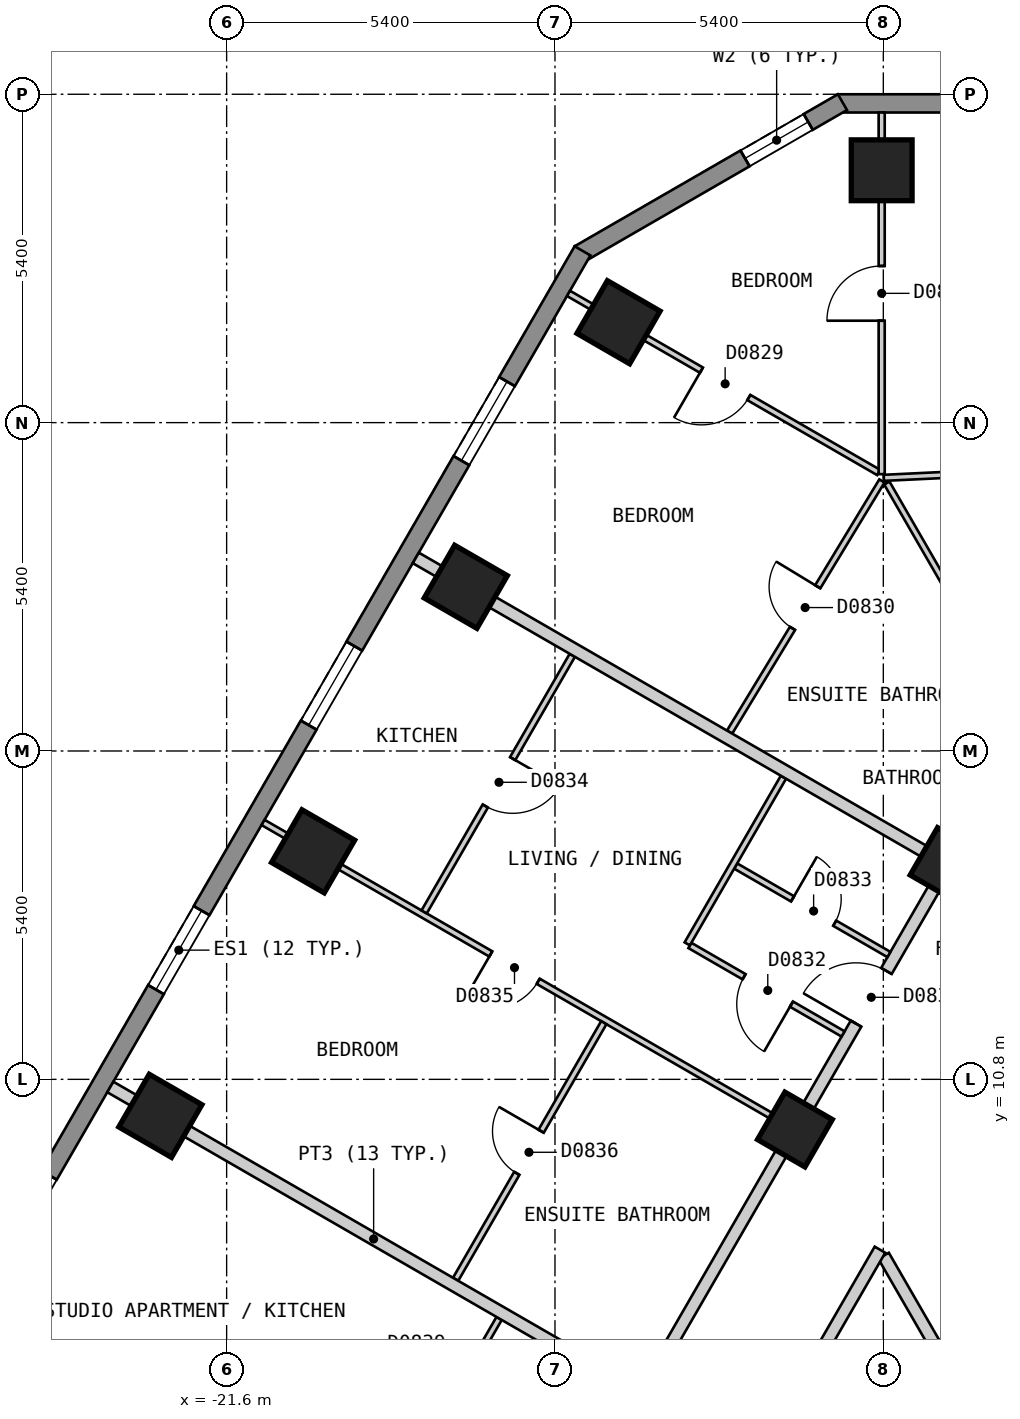
"""IFC4 building model, lengths in metres.
Left out: names, types, materials, properties, quantities, classifications, styles, units other than length and angle.
Written with IfcOpenShell. Run it as: python <this file> out.ifc"""

import sys

from ifc_helpers import new_model, si_unit, direction, frame, frame_2d, origin, origin_2d, place, context, subcontext, project, spatial, polyline, rectangle, outline, extrude, element, fill, save


model = new_model("IFC4")
c1 = context("Model", 3, precision=1e-05, world=origin(), true_north=direction((0.0, 1.0)))
c2 = subcontext(c1, "Body", "Model", "MODEL_VIEW")
j1 = project(units=[si_unit("LENGTHUNIT", "METRE"), si_unit("PLANEANGLEUNIT", "RADIAN")], contexts=[c1])
p1 = place(None, origin())
s1 = spatial("IfcSite", under=j1, at=p1, CompositionType="ELEMENT")
p2 = place(p1, origin())
s2 = spatial("IfcBuilding", under=s1, at=p2, CompositionType="ELEMENT")
p3 = place(p2, frame((0.0, 0.0, 72.0)))
s3 = spatial("IfcBuildingStorey", under=s2, at=p3, CompositionType="ELEMENT", Elevation=72.0)
for number, where, z_axis, x_axis in (
    (1, (-10.827, 25.75, 0.0), (0.0, 0.0, 1.0), (-1.0, 0.0, 0.0)),
    (2, (-15.155, 23.251, 0.0), (0.0, 0.0, 1.0), (-0.5, -0.866, 0.0)),
    (3, (-17.667, 18.9, 0.0), (0.0, 0.0, 1.0), (-0.5, -0.866, 0.0)),
    (4, (-20.178, 14.55, 0.0), (0.0, 0.0, 1.0), (-0.5, -0.866, 0.0)),
    (5, (-22.69, 10.2, 0.0), (0.0, 0.0, 1.0), (-0.5, -0.866, 0.0)),
):
    element("IfcColumn", number, at=place(p3, frame(where, z_axis=z_axis, x_axis=x_axis)), inside=s3, PredefinedType="COLUMN", context=c2, shape_type="SweptSolid", body=[
        extrude(rectangle(XDim=1.0, YDim=1.0, at=origin_2d()), origin(), (0.0, 0.0, 1.0), 3.0),
    ])
for number, where, z_axis, x_axis in (
    (6, (-9.743, 14.325, 0.0), (0.0, 0.0, 1.0), (-0.5, -0.866, 0.0)),
    (7, (-12.254, 9.975, 0.0), (0.0, 0.0, 1.0), (-0.5, -0.866, 0.0)),
):
    element("IfcColumn", number, at=place(p3, frame(where, z_axis=z_axis, x_axis=x_axis)), inside=s3, PredefinedType="COLUMN", context=c2, shape_type="SweptSolid", body=[
        extrude(rectangle(XDim=0.9, YDim=0.9, at=origin_2d()), origin(), (0.0, 0.0, 1.0), 3.0),
    ])
p4 = place(p3, frame((11.547, 26.85, 0.0), z_axis=(0.0, 0.0, 1.0), x_axis=(-1.0, 0.0, 0.0)))
e8 = element("IfcWall", 8, at=p4, inside=s3, PredefinedType="SOLIDWALL", context=c2, shape_type="SweptSolid", body=[
    extrude(outline(polyline([(0.0, -0.15), (23.094, -0.15), (23.014, 0.15), (0.08, 0.15), (0.0, -0.15)])), origin(), (0.0, 0.0, 1.0), 2.7),
])
p5 = place(p4, frame((2.678, 0.0, 0.15)))
e9 = element("IfcOpeningElement", 9, at=p5, cuts=e8, PredefinedType="OPENING", context=c2, shape_type="SweptSolid", body=[
    extrude(rectangle(XDim=1.5, YDim=2.1, at=frame_2d((0.75, 1.05))), frame((0.0, 0.16, 0.0), z_axis=(0.0, -1.0, 0.0), x_axis=(1.0, 0.0, 0.0)), (0.0, 0.0, 1.0), 0.32),
])
p6 = place(p4, frame((8.092, 0.0, 0.15)))
e10 = element("IfcOpeningElement", 10, at=p6, cuts=e8, PredefinedType="OPENING", context=c2, shape_type="SweptSolid", body=[
    extrude(rectangle(XDim=1.5, YDim=2.1, at=frame_2d((0.75, 1.05))), frame((0.0, 0.16, 0.0), z_axis=(0.0, -1.0, 0.0), x_axis=(1.0, 0.0, 0.0)), (0.0, 0.0, 1.0), 0.32),
])
p7 = place(p4, frame((13.504, 0.0, 0.15)))
e11 = element("IfcOpeningElement", 11, at=p7, cuts=e8, PredefinedType="OPENING", context=c2, shape_type="SweptSolid", body=[
    extrude(rectangle(XDim=1.5, YDim=2.1, at=frame_2d((0.75, 1.05))), frame((0.0, 0.16, 0.0), z_axis=(0.0, -1.0, 0.0), x_axis=(1.0, 0.0, 0.0)), (0.0, 0.0, 1.0), 0.32),
])
p8 = place(p4, frame((18.917, 0.0, 0.15)))
e12 = element("IfcOpeningElement", 12, at=p8, cuts=e8, PredefinedType="OPENING", context=c2, shape_type="SweptSolid", body=[
    extrude(rectangle(XDim=1.5, YDim=2.1, at=frame_2d((0.75, 1.05))), frame((0.0, 0.16, 0.0), z_axis=(0.0, -1.0, 0.0), x_axis=(1.0, 0.0, 0.0)), (0.0, 0.0, 1.0), 0.32),
])
p9 = place(p3, frame((-11.472, 26.87, 0.0), z_axis=(0.0, 0.0, 1.0), x_axis=(-0.866022959057, -0.500004234368, 0.0)))
e13 = element("IfcWall", 13, at=p9, inside=s3, PredefinedType="SOLIDWALL", context=c2, shape_type="SweptSolid", body=[
    extrude(outline(polyline([(0.0, -0.15), (5.0, -0.15), (4.92, 0.15), (0.08, 0.15), (0.0, -0.15)])), origin(), (0.0, 0.0, 1.0), 2.7),
])
p10 = place(p9, frame((0.65, 0.0, 0.15)))
e14 = element("IfcOpeningElement", 14, at=p10, cuts=e13, PredefinedType="OPENING", context=c2, shape_type="SweptSolid", body=[
    extrude(rectangle(XDim=1.2, YDim=2.1, at=frame_2d((0.6, 1.05))), frame((0.0, 0.16, 0.0), z_axis=(0.0, -1.0, 0.0), x_axis=(1.0, 0.0, 0.0)), (0.0, 0.0, 1.0), 0.32),
])
p11 = place(p3, frame((-15.747, 24.425, 0.0), z_axis=(0.0, 0.0, 1.0), x_axis=(-0.500027479704, -0.866009537788, 0.0)))
e15 = element("IfcWall", 15, at=p11, inside=s3, PredefinedType="SOLIDWALL", context=c2, shape_type="SweptSolid", body=[
    extrude(outline(polyline([(0.0, -0.15), (26.559, -0.15), (26.478, 0.15), (0.08, 0.15), (0.0, -0.15)])), origin(), (0.0, 0.0, 1.0), 2.7),
])
p12 = place(p11, frame((2.483, 0.0, 0.15)))
e16 = element("IfcOpeningElement", 16, at=p12, cuts=e15, PredefinedType="OPENING", context=c2, shape_type="SweptSolid", body=[
    extrude(rectangle(XDim=1.5, YDim=2.1, at=frame_2d((0.75, 1.05))), frame((0.0, 0.16, 0.0), z_axis=(0.0, -1.0, 0.0), x_axis=(1.0, 0.0, 0.0)), (0.0, 0.0, 1.0), 0.32),
])
p13 = place(p11, frame((7.506, 0.0, 0.15)))
e17 = element("IfcOpeningElement", 17, at=p13, cuts=e15, PredefinedType="OPENING", context=c2, shape_type="SweptSolid", body=[
    extrude(rectangle(XDim=1.5, YDim=2.1, at=frame_2d((0.75, 1.05))), frame((0.0, 0.16, 0.0), z_axis=(0.0, -1.0, 0.0), x_axis=(1.0, 0.0, 0.0)), (0.0, 0.0, 1.0), 0.32),
])
p14 = place(p11, frame((12.529, 0.0, 0.15)))
e18 = element("IfcOpeningElement", 18, at=p14, cuts=e15, PredefinedType="OPENING", context=c2, shape_type="SweptSolid", body=[
    extrude(rectangle(XDim=1.5, YDim=2.1, at=frame_2d((0.75, 1.05))), frame((0.0, 0.16, 0.0), z_axis=(0.0, -1.0, 0.0), x_axis=(1.0, 0.0, 0.0)), (0.0, 0.0, 1.0), 0.32),
])
p15 = place(p11, frame((17.552, 0.0, 0.15)))
e19 = element("IfcOpeningElement", 19, at=p15, cuts=e15, PredefinedType="OPENING", context=c2, shape_type="SweptSolid", body=[
    extrude(rectangle(XDim=1.5, YDim=2.1, at=frame_2d((0.75, 1.05))), frame((0.0, 0.16, 0.0), z_axis=(0.0, -1.0, 0.0), x_axis=(1.0, 0.0, 0.0)), (0.0, 0.0, 1.0), 0.32),
])
p16 = place(p11, frame((22.575, 0.0, 0.15)))
e20 = element("IfcOpeningElement", 20, at=p16, cuts=e15, PredefinedType="OPENING", context=c2, shape_type="SweptSolid", body=[
    extrude(rectangle(XDim=1.5, YDim=2.1, at=frame_2d((0.75, 1.05))), frame((0.0, 0.16, 0.0), z_axis=(0.0, -1.0, 0.0), x_axis=(1.0, 0.0, 0.0)), (0.0, 0.0, 1.0), 0.32),
])
p17 = place(p3, frame((-10.796, 7.899, 0.0), z_axis=(0.0, 0.0, 1.0), x_axis=(0.500010383074, -0.866019409031, 0.0)))
e21 = element("IfcWall", 21, at=p17, inside=s3, PredefinedType="PARTITIONING", context=c2, shape_type="SweptSolid", body=[
    extrude(rectangle(XDim=7.535, YDim=0.2, at=frame_2d((3.768, 0.0))), origin(), (0.0, 0.0, 1.0), 2.7),
])
p18 = place(p3, frame((-16.05, -1.0, 0.0), z_axis=(0.0, 0.0, 1.0), x_axis=(0.499962449088, 0.866047082728, 0.0)))
e22 = element("IfcWall", 22, at=p18, inside=s3, PredefinedType="PARTITIONING", context=c2, shape_type="SweptSolid", body=[
    extrude(rectangle(XDim=10.391, YDim=0.2, at=frame_2d((5.195, 0.0))), origin(), (0.0, 0.0, 1.0), 2.7),
])
p19 = place(p18, frame((4.745, 0.0, 0.0)))
e23 = element("IfcOpeningElement", 23, at=p19, cuts=e22, PredefinedType="OPENING", context=c2, shape_type="SweptSolid", body=[
    extrude(rectangle(XDim=0.9, YDim=2.1, at=frame_2d((0.45, 1.05))), frame((0.0, 0.11, 0.0), z_axis=(0.0, -1.0, 0.0), x_axis=(1.0, 0.0, 0.0)), (0.0, 0.0, 1.0), 0.22),
])
p20 = place(p3, frame((-18.562, -0.951, 0.0), z_axis=(0.0, 0.0, 1.0), x_axis=(0.499992962407, 0.866029466902, 0.0)))
e24 = element("IfcWall", 24, at=p20, inside=s3, PredefinedType="PARTITIONING", context=c2, shape_type="SweptSolid", body=[
    extrude(rectangle(XDim=20.208, YDim=0.2, at=frame_2d((10.104, 0.0))), origin(), (0.0, 0.0, 1.0), 2.7),
])
p21 = place(p20, frame((14.627, 0.0, 0.0)))
e25 = element("IfcOpeningElement", 25, at=p21, cuts=e24, PredefinedType="OPENING", context=c2, shape_type="SweptSolid", body=[
    extrude(rectangle(XDim=1.0, YDim=2.1, at=frame_2d((0.5, 1.05))), frame((0.0, 0.11, 0.0), z_axis=(0.0, -1.0, 0.0), x_axis=(1.0, 0.0, 0.0)), (0.0, 0.0, 1.0), 0.22),
])
p22 = place(p20, frame((4.581, 0.0, 0.0)))
e26 = element("IfcOpeningElement", 26, at=p22, cuts=e24, PredefinedType="OPENING", context=c2, shape_type="SweptSolid", body=[
    extrude(rectangle(XDim=1.0, YDim=2.1, at=frame_2d((0.5, 1.05))), frame((0.0, 0.11, 0.0), z_axis=(0.0, -1.0, 0.0), x_axis=(1.0, 0.0, 0.0)), (0.0, 0.0, 1.0), 0.22),
])
p23 = place(p3, frame((-10.742, 20.606, 0.0), z_axis=(0.0, 0.0, 1.0), x_axis=(0.50003312339, -0.866006279142, 0.0)))
e27 = element("IfcWall", 27, at=p23, inside=s3, PredefinedType="PARTITIONING", context=c2, shape_type="SweptSolid", body=[
    extrude(rectangle(XDim=4.626, YDim=0.1, at=frame_2d((2.313, 0.0))), origin(), (0.0, 0.0, 1.0), 2.7),
])
p24 = place(p3, frame((-13.981, 13.002, 0.0), z_axis=(0.0, 0.0, 1.0), x_axis=(0.86595634977, -0.500119585993, 0.0)))
e28 = element("IfcWall", 28, at=p24, inside=s3, PredefinedType="PARTITIONING", context=c2, shape_type="SweptSolid", body=[
    extrude(rectangle(XDim=2.909, YDim=0.1, at=frame_2d((1.455, 0.0))), origin(), (0.0, 0.0, 1.0), 2.7),
])
p25 = place(p24, frame((1.029, 0.0, 0.0)))
e29 = element("IfcOpeningElement", 29, at=p25, cuts=e28, PredefinedType="OPENING", context=c2, shape_type="SweptSolid", body=[
    extrude(rectangle(XDim=0.9, YDim=2.1, at=frame_2d((0.45, 1.05))), frame((0.0, 0.06, 0.0), z_axis=(0.0, -1.0, 0.0), x_axis=(1.0, 0.0, 0.0)), (0.0, 0.0, 1.0), 0.12),
])
p26 = place(p3, frame((-13.228, 14.308, 0.0), z_axis=(0.0, 0.0, 1.0), x_axis=(0.866003949776, -0.500037157592, 0.0)))
e30 = element("IfcWall", 30, at=p26, inside=s3, PredefinedType="PARTITIONING", context=c2, shape_type="SweptSolid", body=[
    extrude(rectangle(XDim=2.91, YDim=0.1, at=frame_2d((1.455, 0.0))), origin(), (0.0, 0.0, 1.0), 2.7),
])
p27 = place(p26, frame((1.08, 0.0, 0.0)))
e31 = element("IfcOpeningElement", 31, at=p27, cuts=e30, PredefinedType="OPENING", context=c2, shape_type="SweptSolid", body=[
    extrude(rectangle(XDim=0.8, YDim=2.1, at=frame_2d((0.4, 1.05))), frame((0.0, 0.06, 0.0), z_axis=(0.0, -1.0, 0.0), x_axis=(1.0, 0.0, 0.0)), (0.0, 0.0, 1.0), 0.12),
])
p28 = place(p3, frame((-15.977, 23.725, 0.0), z_axis=(0.0, 0.0, 1.0), x_axis=(0.866028213039, -0.499995134196, 0.0)))
e32 = element("IfcWall", 32, at=p28, inside=s3, PredefinedType="PARTITIONING", context=c2, shape_type="SweptSolid", body=[
    extrude(rectangle(XDim=5.89, YDim=0.1, at=frame_2d((2.945, 0.0))), origin(), (0.0, 0.0, 1.0), 2.7),
])
p29 = place(p28, frame((2.524, 0.0, 0.0)))
e33 = element("IfcOpeningElement", 33, at=p29, cuts=e32, PredefinedType="OPENING", context=c2, shape_type="SweptSolid", body=[
    extrude(rectangle(XDim=0.9, YDim=2.1, at=frame_2d((0.45, 1.05))), frame((0.0, 0.06, 0.0), z_axis=(0.0, -1.0, 0.0), x_axis=(1.0, 0.0, 0.0)), (0.0, 0.0, 1.0), 0.12),
])
p30 = place(p3, frame((-21.001, 15.025, 0.0), z_axis=(0.0, 0.0, 1.0), x_axis=(0.866016855193, -0.500014806302, 0.0)))
e34 = element("IfcWall", 34, at=p30, inside=s3, PredefinedType="PARTITIONING", context=c2, shape_type="SweptSolid", body=[
    extrude(rectangle(XDim=10.0, YDim=0.1, at=frame_2d((5.0, 0.0))), origin(), (0.0, 0.0, 1.0), 2.7),
])
p31 = place(p30, frame((4.325, 0.0, 0.0)))
e35 = element("IfcOpeningElement", 35, at=p31, cuts=e34, PredefinedType="OPENING", context=c2, shape_type="SweptSolid", body=[
    extrude(rectangle(XDim=0.9, YDim=2.1, at=frame_2d((0.45, 1.05))), frame((0.0, 0.06, 0.0), z_axis=(0.0, -1.0, 0.0), x_axis=(1.0, 0.0, 0.0)), (0.0, 0.0, 1.0), 0.12),
])
p32 = place(p3, frame((-13.328, 16.511, 0.0), z_axis=(0.0, 0.0, 1.0), x_axis=(0.518570528669, 0.855034857065, 0.0)))
e36 = element("IfcWall", 36, at=p32, inside=s3, PredefinedType="PARTITIONING", context=c2, shape_type="SweptSolid", body=[
    extrude(rectangle(XDim=4.83, YDim=0.1, at=frame_2d((2.415, 0.0))), origin(), (0.0, 0.0, 1.0), 2.7),
])
p33 = place(p32, frame((1.995, 0.0, 0.0)))
e37 = element("IfcOpeningElement", 37, at=p33, cuts=e36, PredefinedType="OPENING", context=c2, shape_type="SweptSolid", body=[
    extrude(rectangle(XDim=0.8, YDim=2.1, at=frame_2d((0.4, 1.05))), frame((0.0, 0.06, 0.0), z_axis=(0.0, -1.0, 0.0), x_axis=(1.0, 0.0, 0.0)), (0.0, 0.0, 1.0), 0.12),
])
for number, where, z_axis, x_axis in (
    (38, (-18.701, 4.128, 0.0), (0.0, 0.0, 1.0), (0.5, 0.866, 0.0)),
    (39, (-14.025, 13.028, 0.0), (0.0, 0.0, 1.0), (0.5, 0.866, 0.0)),
):
    element("IfcWall", number, at=place(p3, frame(where, z_axis=z_axis, x_axis=x_axis)), inside=s3, PredefinedType="PARTITIONING", context=c2, shape_type="SweptSolid", body=[
        extrude(rectangle(XDim=3.164, YDim=0.1, at=frame_2d((1.582, 0.0))), origin(), (0.0, 0.0, 1.0), 2.7),
    ])
p34 = place(p3, frame((-17.834, 7.512, 0.0), z_axis=(0.0, 0.0, 1.0), x_axis=(0.500093956194, 0.865971151354, 0.0)))
e40 = element("IfcWall", 40, at=p34, inside=s3, PredefinedType="PARTITIONING", context=c2, shape_type="SweptSolid", body=[
    extrude(rectangle(XDim=4.873, YDim=0.1, at=frame_2d((2.437, 0.0))), origin(), (0.0, 0.0, 1.0), 2.7),
])
p35 = place(p34, frame((2.012, 0.0, 0.0)))
e41 = element("IfcOpeningElement", 41, at=p35, cuts=e40, PredefinedType="OPENING", context=c2, shape_type="SweptSolid", body=[
    extrude(rectangle(XDim=0.8, YDim=2.1, at=frame_2d((0.4, 1.05))), frame((0.0, 0.06, 0.0), z_axis=(0.0, -1.0, 0.0), x_axis=(1.0, 0.0, 0.0)), (0.0, 0.0, 1.0), 0.12),
])
p36 = place(p3, frame((-18.352, 13.553, 0.0), z_axis=(0.0, 0.0, 1.0), x_axis=(0.500007182864, 0.866021256716, 0.0)))
e42 = element("IfcWall", 42, at=p36, inside=s3, PredefinedType="PARTITIONING", context=c2, shape_type="SweptSolid", body=[
    extrude(rectangle(XDim=4.874, YDim=0.1, at=frame_2d((2.437, 0.0))), origin(), (0.0, 0.0, 1.0), 2.7),
])
p37 = place(p36, frame((2.012, 0.0, 0.0)))
e43 = element("IfcOpeningElement", 43, at=p37, cuts=e42, PredefinedType="OPENING", context=c2, shape_type="SweptSolid", body=[
    extrude(rectangle(XDim=0.9, YDim=2.1, at=frame_2d((0.45, 1.05))), frame((0.0, 0.06, 0.0), z_axis=(0.0, -1.0, 0.0), x_axis=(1.0, 0.0, 0.0)), (0.0, 0.0, 1.0), 0.12),
])
p38 = place(p3, frame((-10.827, 20.753, 0.0), z_axis=(0.0, 0.0, 1.0), x_axis=(0.0, 1.0, 0.0)))
e44 = element("IfcWall", 44, at=p38, inside=s3, PredefinedType="PARTITIONING", context=c2, shape_type="SweptSolid", body=[
    extrude(rectangle(XDim=5.947, YDim=0.1, at=frame_2d((2.974, 0.0))), origin(), (0.0, 0.0, 1.0), 2.7),
])
p39 = place(p38, frame((2.523, 0.0, 0.0)))
e45 = element("IfcOpeningElement", 45, at=p39, cuts=e44, PredefinedType="OPENING", context=c2, shape_type="SweptSolid", body=[
    extrude(rectangle(XDim=0.9, YDim=2.1, at=frame_2d((0.45, 1.05))), frame((0.0, 0.06, 0.0), z_axis=(0.0, -1.0, 0.0), x_axis=(1.0, 0.0, 0.0)), (0.0, 0.0, 1.0), 0.12),
])
p40 = place(p3, frame((-10.792, 20.692, 0.0), z_axis=(0.0, 0.0, 1.0), x_axis=(0.998861653202, 0.04770112957, 0.0)))
e46 = element("IfcWall", 46, at=p40, inside=s3, PredefinedType="PARTITIONING", context=c2, shape_type="SweptSolid", body=[
    extrude(rectangle(XDim=1.28, YDim=0.1, at=frame_2d((0.64, 0.0))), origin(), (0.0, 0.0, 1.0), 2.7),
])
p41 = place(p3, frame((-23.513, 10.675, 0.0), z_axis=(0.0, 0.0, 1.0), x_axis=(0.866041268327, -0.499972520799, 0.0)))
e47 = element("IfcWall", 47, at=p41, inside=s3, PredefinedType="PARTITIONING", context=c2, shape_type="SweptSolid", body=[
    extrude(rectangle(XDim=10.0, YDim=0.2, at=frame_2d((5.0, 0.0))), origin(), (0.0, 0.0, 1.0), 2.7),
])
p42 = place(p3, frame((-18.489, 19.375, 0.0), z_axis=(0.0, 0.0, 1.0), x_axis=(0.866016855193, -0.500014806302, 0.0)))
e48 = element("IfcWall", 48, at=p42, inside=s3, PredefinedType="PARTITIONING", context=c2, shape_type="SweptSolid", body=[
    extrude(rectangle(XDim=10.0, YDim=0.2, at=frame_2d((5.0, 0.0))), origin(), (0.0, 0.0, 1.0), 2.7),
])
p43 = place(p10, origin())
e49 = element("IfcWindow", 49, at=p43, inside=s3, PartitioningType="SINGLE_PANEL", PredefinedType="WINDOW", context=c2, shape_type="SweptSolid", body=[
    extrude(rectangle(XDim=1.2, YDim=2.1, at=frame_2d((0.6, 1.05))), frame((0.0, 0.03, 0.0), z_axis=(0.0, -1.0, 0.0), x_axis=(1.0, 0.0, 0.0)), (0.0, 0.0, 1.0), 0.06),
])
fill(e14, e49)
p44 = place(p12, origin())
e50 = element("IfcWindow", 50, at=p44, inside=s3, PartitioningType="SINGLE_PANEL", PredefinedType="WINDOW", context=c2, shape_type="SweptSolid", body=[
    extrude(rectangle(XDim=1.5, YDim=2.1, at=frame_2d((0.75, 1.05))), frame((0.0, 0.03, 0.0), z_axis=(0.0, -1.0, 0.0), x_axis=(1.0, 0.0, 0.0)), (0.0, 0.0, 1.0), 0.06),
])
fill(e16, e50)
p45 = place(p13, origin())
e51 = element("IfcWindow", 51, at=p45, inside=s3, PartitioningType="SINGLE_PANEL", PredefinedType="WINDOW", context=c2, shape_type="SweptSolid", body=[
    extrude(rectangle(XDim=1.5, YDim=2.1, at=frame_2d((0.75, 1.05))), frame((0.0, 0.03, 0.0), z_axis=(0.0, -1.0, 0.0), x_axis=(1.0, 0.0, 0.0)), (0.0, 0.0, 1.0), 0.06),
])
fill(e17, e51)
p46 = place(p14, origin())
e52 = element("IfcWindow", 52, at=p46, inside=s3, PartitioningType="SINGLE_PANEL", PredefinedType="WINDOW", context=c2, shape_type="SweptSolid", body=[
    extrude(rectangle(XDim=1.5, YDim=2.1, at=frame_2d((0.75, 1.05))), frame((0.0, 0.03, 0.0), z_axis=(0.0, -1.0, 0.0), x_axis=(1.0, 0.0, 0.0)), (0.0, 0.0, 1.0), 0.06),
])
fill(e18, e52)
p47 = place(p39, origin())
e53 = element("IfcDoor", 53, at=p47, inside=s3, OperationType="SINGLE_SWING_LEFT", PredefinedType="DOOR", context=c2, shape_type="SweptSolid", body=[
    extrude(rectangle(XDim=0.9, YDim=2.1, at=frame_2d((0.45, 1.05))), frame((0.0, 0.025, 0.0), z_axis=(0.0, -1.0, 0.0), x_axis=(1.0, 0.0, 0.0)), (0.0, 0.0, 1.0), 0.05),
])
fill(e45, e53)
p48 = place(p29, origin())
e54 = element("IfcDoor", 54, at=p48, inside=s3, OperationType="SINGLE_SWING_LEFT", PredefinedType="DOOR", context=c2, shape_type="SweptSolid", body=[
    extrude(rectangle(XDim=0.9, YDim=2.1, at=frame_2d((0.45, 1.05))), frame((0.0, 0.025, 0.0), z_axis=(0.0, -1.0, 0.0), x_axis=(1.0, 0.0, 0.0)), (0.0, 0.0, 1.0), 0.05),
])
fill(e33, e54)
p49 = place(p33, origin())
e55 = element("IfcDoor", 55, at=p49, inside=s3, OperationType="SINGLE_SWING_RIGHT", PredefinedType="DOOR", context=c2, shape_type="SweptSolid", body=[
    extrude(rectangle(XDim=0.8, YDim=2.1, at=frame_2d((0.4, 1.05))), frame((0.0, 0.025, 0.0), z_axis=(0.0, -1.0, 0.0), x_axis=(1.0, 0.0, 0.0)), (0.0, 0.0, 1.0), 0.05),
])
fill(e37, e55)
p50 = place(p21, origin())
e56 = element("IfcDoor", 56, at=p50, inside=s3, OperationType="SINGLE_SWING_LEFT", PredefinedType="DOOR", context=c2, shape_type="SweptSolid", body=[
    extrude(rectangle(XDim=1.0, YDim=2.1, at=frame_2d((0.5, 1.05))), frame((0.0, 0.025, 0.0), z_axis=(0.0, -1.0, 0.0), x_axis=(1.0, 0.0, 0.0)), (0.0, 0.0, 1.0), 0.05),
])
fill(e25, e56)
p51 = place(p25, origin())
e57 = element("IfcDoor", 57, at=p51, inside=s3, OperationType="SINGLE_SWING_RIGHT", PredefinedType="DOOR", context=c2, shape_type="SweptSolid", body=[
    extrude(rectangle(XDim=0.9, YDim=2.1, at=frame_2d((0.45, 1.05))), frame((0.0, 0.025, 0.0), z_axis=(0.0, -1.0, 0.0), x_axis=(1.0, 0.0, 0.0)), (0.0, 0.0, 1.0), 0.05),
])
fill(e29, e57)
p52 = place(p27, origin())
e58 = element("IfcDoor", 58, at=p52, inside=s3, OperationType="SINGLE_SWING_LEFT", PredefinedType="DOOR", context=c2, shape_type="SweptSolid", body=[
    extrude(rectangle(XDim=0.8, YDim=2.1, at=frame_2d((0.4, 1.05))), frame((0.0, 0.025, 0.0), z_axis=(0.0, -1.0, 0.0), x_axis=(1.0, 0.0, 0.0)), (0.0, 0.0, 1.0), 0.05),
])
fill(e31, e58)
p53 = place(p37, origin())
e59 = element("IfcDoor", 59, at=p53, inside=s3, OperationType="SINGLE_SWING_RIGHT", PredefinedType="DOOR", context=c2, shape_type="SweptSolid", body=[
    extrude(rectangle(XDim=0.9, YDim=2.1, at=frame_2d((0.45, 1.05))), frame((0.0, 0.025, 0.0), z_axis=(0.0, -1.0, 0.0), x_axis=(1.0, 0.0, 0.0)), (0.0, 0.0, 1.0), 0.05),
])
fill(e43, e59)
p54 = place(p31, origin())
e60 = element("IfcDoor", 60, at=p54, inside=s3, OperationType="SINGLE_SWING_LEFT", PredefinedType="DOOR", context=c2, shape_type="SweptSolid", body=[
    extrude(rectangle(XDim=0.9, YDim=2.1, at=frame_2d((0.45, 1.05))), frame((0.0, 0.025, 0.0), z_axis=(0.0, -1.0, 0.0), x_axis=(1.0, 0.0, 0.0)), (0.0, 0.0, 1.0), 0.05),
])
fill(e35, e60)
p55 = place(p35, origin())
e61 = element("IfcDoor", 61, at=p55, inside=s3, OperationType="SINGLE_SWING_RIGHT", PredefinedType="DOOR", context=c2, shape_type="SweptSolid", body=[
    extrude(rectangle(XDim=0.8, YDim=2.1, at=frame_2d((0.4, 1.05))), frame((0.0, 0.025, 0.0), z_axis=(0.0, -1.0, 0.0), x_axis=(1.0, 0.0, 0.0)), (0.0, 0.0, 1.0), 0.05),
])
fill(e41, e61)
save(model, sys.argv[1])
